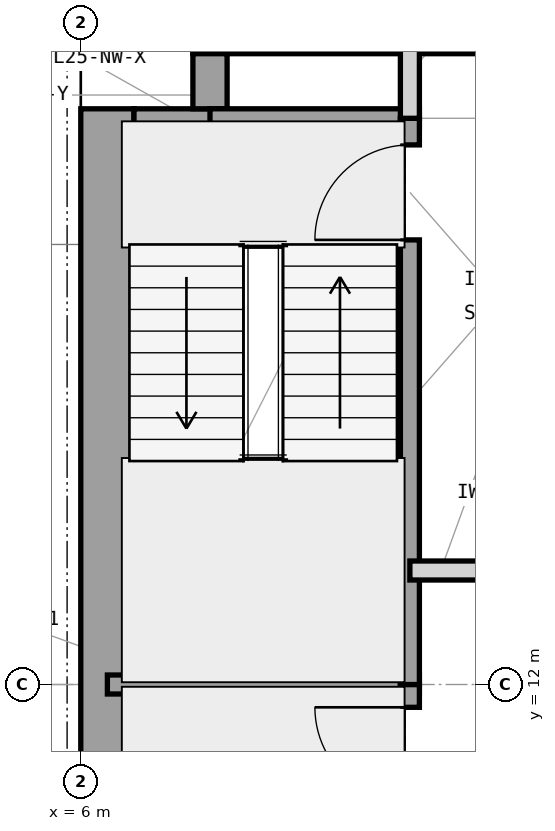
"""IFC4 building model, lengths in metres.
Left out: names, types, materials, properties, quantities, classifications, styles, units other than length and angle.
Written with IfcOpenShell. Run it as: python <this file> out.ifc"""

import sys

from ifc_helpers import new_model, si_unit, direction, frame, frame_2d, origin, place, context, subcontext, project, spatial, rectangle, extrude, element, fill, save


model = new_model("IFC4")
c1 = context("Model", 3, precision=1e-05, world=origin(), true_north=direction((0.0, 1.0)))
c2 = subcontext(c1, "Body", "Model", "MODEL_VIEW")
j1 = project(units=[si_unit("LENGTHUNIT", "METRE"), si_unit("PLANEANGLEUNIT", "RADIAN")], contexts=[c1])
p1 = place(None, origin())
s1 = spatial("IfcSite", under=j1, at=p1, CompositionType="ELEMENT")
p2 = place(p1, origin())
s2 = spatial("IfcBuilding", under=s1, at=p2, CompositionType="ELEMENT")
p3 = place(p2, frame((0.0, 0.0, 108.9)))
s3 = spatial("IfcBuildingStorey", under=s2, at=p3, CompositionType="ELEMENT", Elevation=108.9)
p4 = place(p3, frame((6.35, 4.425, 0.0), z_axis=(0.0, 0.0, 1.0), x_axis=(0.0, 1.0, 0.0)))
e1 = element("IfcWall", 1, at=p4, inside=s3, PredefinedType="SHEAR", context=c2, shape_type="SweptSolid", body=[
    extrude(rectangle(XDim=15.15, YDim=0.7, at=frame_2d((7.575, 0.0))), origin(), (0.0, 0.0, 1.0), 3.9),
])
p5 = place(p3, frame((7.475, 20.65, 0.0), z_axis=(0.0, 0.0, 1.0), x_axis=(1.0, 0.0, 0.0)))
e2 = element("IfcWall", 2, at=p5, inside=s3, PredefinedType="SHEAR", context=c2, shape_type="SweptSolid", body=[
    extrude(rectangle(XDim=12.325, YDim=0.7, at=frame_2d((6.163, 0.0))), origin(), (0.0, 0.0, 1.0), 3.9),
])
p6 = place(p3, frame((6.7, 19.35, 0.0), z_axis=(0.0, 0.0, 1.0), x_axis=(1.0, 0.0, 0.0)))
e3 = element("IfcWall", 3, at=p6, inside=s3, PredefinedType="SHEAR", context=c2, shape_type="SweptSolid", body=[
    extrude(rectangle(XDim=1.225, YDim=0.45, at=frame_2d((0.613, 0.0))), origin(), (0.0, 0.0, 1.0), 3.9),
])
p7 = place(p3, frame((7.7, 19.575, 0.0), z_axis=(0.0, 0.0, 1.0), x_axis=(0.0, 1.0, 0.0)))
e4 = element("IfcWall", 4, at=p7, inside=s3, PredefinedType="SHEAR", context=c2, shape_type="SweptSolid", body=[
    extrude(rectangle(XDim=0.725, YDim=0.45, at=frame_2d((0.363, 0.0))), origin(), (0.0, 0.0, 1.0), 3.9),
])
p8 = place(p3, frame((6.35, 12.0, 0.0), z_axis=(0.0, 0.0, 1.0), x_axis=(1.0, 0.0, 0.0)))
e5 = element("IfcWall", 5, at=p8, inside=s3, PredefinedType="SHEAR", context=c2, shape_type="SweptSolid", body=[
    extrude(rectangle(XDim=4.105, YDim=0.25, at=frame_2d((2.052, 0.0))), origin(), (0.0, 0.0, 1.0), 3.9),
])
p9 = place(p3, frame((7.7, 19.45, 0.0), z_axis=(0.0, 0.0, 1.0), x_axis=(1.0, 0.0, 0.0)))
e6 = element("IfcWall", 6, at=p9, inside=s3, PredefinedType="SHEAR", context=c2, shape_type="SweptSolid", body=[
    extrude(rectangle(XDim=2.755, YDim=0.25, at=frame_2d((1.377, 0.0))), origin(), (0.0, 0.0, 1.0), 3.9),
])
p10 = place(p3, frame((10.33, 4.55, 0.0), z_axis=(0.0, 0.0, 1.0), x_axis=(0.0, 1.0, 0.0)))
e7 = element("IfcWall", 7, at=p10, inside=s3, PredefinedType="SHEAR", context=c2, shape_type="SweptSolid", body=[
    extrude(rectangle(XDim=7.45, YDim=0.25, at=frame_2d((3.725, 0.0))), origin(), (0.0, 0.0, 1.0), 3.9),
])
p11 = place(p10, frame((5.9, 0.0, 0.0)))
e8 = element("IfcOpeningElement", 8, at=p11, cuts=e7, PredefinedType="OPENING", context=c2, shape_type="SweptSolid", body=[
    extrude(rectangle(XDim=1.25, YDim=2.2, at=frame_2d((0.625, 1.1))), frame((0.0, 0.135, 0.0), z_axis=(0.0, -1.0, 0.0), x_axis=(1.0, 0.0, 0.0)), (0.0, 0.0, 1.0), 0.27),
])
p12 = place(p3, frame((10.33, 12.0, 0.0), z_axis=(0.0, 0.0, 1.0), x_axis=(0.0, 1.0, 0.0)))
e9 = element("IfcWall", 9, at=p12, inside=s3, PredefinedType="SHEAR", context=c2, shape_type="SweptSolid", body=[
    extrude(rectangle(XDim=7.45, YDim=0.25, at=frame_2d((3.725, 0.0))), origin(), (0.0, 0.0, 1.0), 3.9),
])
p13 = place(p12, frame((5.85, 0.0, 0.0)))
e10 = element("IfcOpeningElement", 10, at=p13, cuts=e9, PredefinedType="OPENING", context=c2, shape_type="SweptSolid", body=[
    extrude(rectangle(XDim=1.25, YDim=2.2, at=frame_2d((0.625, 1.1))), frame((0.0, 0.135, 0.0), z_axis=(0.0, -1.0, 0.0), x_axis=(1.0, 0.0, 0.0)), (0.0, 0.0, 1.0), 0.27),
])
p14 = place(p3, frame((10.33, 19.45, 0.0), z_axis=(0.0, 0.0, 1.0), x_axis=(0.0, 1.0, 0.0)))
e11 = element("IfcWall", 11, at=p14, inside=s3, PredefinedType="PARTITIONING", context=c2, shape_type="SweptSolid", body=[
    extrude(rectangle(XDim=1.2, YDim=0.25, at=frame_2d((0.6, 0.0))), origin(), (0.0, 0.0, 1.0), 2.917),
])
p15 = place(p3, frame((10.33, 13.5, 0.0), z_axis=(0.0, 0.0, 1.0), x_axis=(1.0, 0.0, 0.0)))
e12 = element("IfcWall", 12, at=p15, inside=s3, PredefinedType="PARTITIONING", context=c2, shape_type="SweptSolid", body=[
    extrude(rectangle(XDim=1.62, YDim=0.25, at=frame_2d((0.81, 0.0))), origin(), (0.0, 0.0, 1.0), 3.227),
])
p16 = place(p11, origin())
e13 = element("IfcDoor", 13, at=p16, inside=s3, OperationType="SINGLE_SWING_RIGHT", PredefinedType="DOOR", context=c2, shape_type="SweptSolid", body=[
    extrude(rectangle(XDim=1.25, YDim=2.2, at=frame_2d((0.625, 1.1))), frame((0.0, 0.025, 0.0), z_axis=(0.0, -1.0, 0.0), x_axis=(1.0, 0.0, 0.0)), (0.0, 0.0, 1.0), 0.05),
])
fill(e8, e13)
p17 = place(p13, origin())
e14 = element("IfcDoor", 14, at=p17, inside=s3, OperationType="SINGLE_SWING_LEFT", PredefinedType="DOOR", context=c2, shape_type="SweptSolid", body=[
    extrude(rectangle(XDim=1.25, YDim=2.2, at=frame_2d((0.625, 1.1))), frame((0.0, 0.025, 0.0), z_axis=(0.0, -1.0, 0.0), x_axis=(1.0, 0.0, 0.0)), (0.0, 0.0, 1.0), 0.05),
])
fill(e10, e14)
save(model, sys.argv[1])
